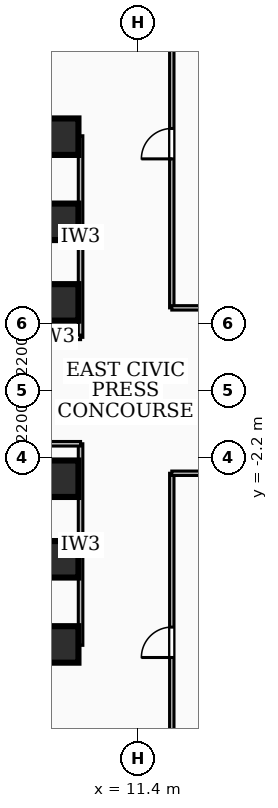
"""IFC4 building model, lengths in metres.
Left out: names, types, materials, properties, quantities, classifications, styles, units other than length and angle.
Written with IfcOpenShell. Run it as: python <this file> out.ifc"""

import sys

from ifc_helpers import new_model, si_unit, direction, frame, frame_2d, origin, origin_2d, place, context, subcontext, project, spatial, rectangle, extrude, element, fill, save


model = new_model("IFC4")
c1 = context("Model", 3, precision=1e-05, world=origin(), true_north=direction((0.0, 1.0)))
c2 = subcontext(c1, "Body", "Model", "MODEL_VIEW")
j1 = project(units=[si_unit("LENGTHUNIT", "METRE"), si_unit("PLANEANGLEUNIT", "RADIAN")], contexts=[c1])
p1 = place(None, origin())
s1 = spatial("IfcSite", under=j1, at=p1, CompositionType="ELEMENT")
p2 = place(p1, origin())
s2 = spatial("IfcBuilding", under=s1, at=p2, CompositionType="ELEMENT")
p3 = place(p2, frame((0.0, 0.0, 14.76)))
s3 = spatial("IfcBuildingStorey", under=s2, at=p3, CompositionType="ELEMENT", Elevation=14.76)
for number, where, z_axis, x_axis in (
    (1, (-8.78, 8.585, 0.0), (0.0, 0.0, 1.0), (1.0, 0.0, 0.0)),
    (2, (8.78, -8.585, 0.0), (0.0, 0.0, 1.0), (-1.0, 0.0, 0.0)),
):
    element("IfcWall", number, at=place(p3, frame(where, z_axis=z_axis, x_axis=x_axis)), inside=s3, PredefinedType="SHEAR", context=c2, shape_type="SweptSolid", body=[
        extrude(rectangle(XDim=17.56, YDim=0.55, at=frame_2d((8.78, 0.0))), origin(), (0.0, 0.0, 1.0), 4.28),
    ])
for number, where, z_axis, x_axis in (
    (3, (8.85, -5.55, 0.0), (0.0, 0.0, 1.0), (1.0, 0.0, 0.0)),
    (4, (8.85, -2.9, 0.0), (0.0, 0.0, 1.0), (1.0, 0.0, 0.0)),
    (5, (8.85, 2.9, 0.0), (0.0, 0.0, 1.0), (1.0, 0.0, 0.0)),
    (6, (8.85, 5.55, 0.0), (0.0, 0.0, 1.0), (1.0, 0.0, 0.0)),
    (7, (8.85, -8.35, 0.0), (0.0, 0.0, 1.0), (1.0, 0.0, 0.0)),
    (8, (8.85, 8.35, 0.0), (0.0, 0.0, 1.0), (1.0, 0.0, 0.0)),
):
    element("IfcColumn", number, at=place(p3, frame(where, z_axis=z_axis, x_axis=x_axis)), inside=s3, PredefinedType="COLUMN", context=c2, shape_type="SweptSolid", body=[
        extrude(rectangle(XDim=1.2, YDim=1.2, at=origin_2d()), origin(), (0.0, 0.0, 1.0), 4.68),
    ])
p4 = place(p3, frame((9.52, 1.75, 0.0), z_axis=(0.0, 0.0, 1.0), x_axis=(0.0, 1.0, 0.0)))
e9 = element("IfcWall", 9, at=p4, inside=s3, PredefinedType="PARTITIONING", context=c2, shape_type="SweptSolid", body=[
    extrude(rectangle(XDim=6.63, YDim=0.15, at=frame_2d((3.315, 0.0))), origin(), (0.0, 0.0, 1.0), 3.29),
])
p5 = place(p3, frame((7.85, 1.75, 0.0), z_axis=(0.0, 0.0, 1.0), x_axis=(1.0, 0.0, 0.0)))
e10 = element("IfcWall", 10, at=p5, inside=s3, PredefinedType="PARTITIONING", context=c2, shape_type="SweptSolid", body=[
    extrude(rectangle(XDim=1.67, YDim=0.15, at=frame_2d((0.835, 0.0))), origin(), (0.0, 0.0, 1.0), 3.345),
])
p6 = place(p3, frame((9.52, -8.38, 0.0), z_axis=(0.0, 0.0, 1.0), x_axis=(0.0, 1.0, 0.0)))
e11 = element("IfcWall", 11, at=p6, inside=s3, PredefinedType="PARTITIONING", context=c2, shape_type="SweptSolid", body=[
    extrude(rectangle(XDim=6.63, YDim=0.15, at=frame_2d((3.315, 0.0))), origin(), (0.0, 0.0, 1.0), 3.29),
])
p7 = place(p3, frame((7.85, -1.75, 0.0), z_axis=(0.0, 0.0, 1.0), x_axis=(1.0, 0.0, 0.0)))
e12 = element("IfcWall", 12, at=p7, inside=s3, PredefinedType="PARTITIONING", context=c2, shape_type="SweptSolid", body=[
    extrude(rectangle(XDim=1.67, YDim=0.15, at=frame_2d((0.835, 0.0))), origin(), (0.0, 0.0, 1.0), 3.345),
])
p8 = place(p3, frame((12.52, 2.72, 0.0), z_axis=(0.0, 0.0, 1.0), x_axis=(0.0, 1.0, 0.0)))
e13 = element("IfcWall", 13, at=p8, inside=s3, PredefinedType="PARTITIONING", context=c2, shape_type="SweptSolid", body=[
    extrude(rectangle(XDim=10.96, YDim=0.145, at=frame_2d((5.48, 0.0))), origin(), (0.0, 0.0, 1.0), 3.29),
])
p9 = place(p8, frame((4.9, 0.0, 0.0)))
e14 = element("IfcOpeningElement", 14, at=p9, cuts=e13, PredefinedType="OPENING", context=c2, shape_type="SweptSolid", body=[
    extrude(rectangle(XDim=1.0, YDim=2.1, at=frame_2d((0.5, 1.05))), frame((0.0, 0.083, 0.0), z_axis=(0.0, -1.0, 0.0), x_axis=(1.0, 0.0, 0.0)), (0.0, 0.0, 1.0), 0.165),
])
p10 = place(p3, frame((12.52, 2.72, 0.0), z_axis=(0.0, 0.0, 1.0), x_axis=(1.0, 0.0, 0.0)))
e15 = element("IfcWall", 15, at=p10, inside=s3, PredefinedType="PARTITIONING", context=c2, shape_type="SweptSolid", body=[
    extrude(rectangle(XDim=9.88, YDim=0.145, at=frame_2d((4.94, 0.0))), origin(), (0.0, 0.0, 1.0), 4.28),
])
p11 = place(p3, frame((12.52, -13.68, 0.0), z_axis=(0.0, 0.0, 1.0), x_axis=(0.0, 1.0, 0.0)))
e16 = element("IfcWall", 16, at=p11, inside=s3, PredefinedType="PARTITIONING", context=c2, shape_type="SweptSolid", body=[
    extrude(rectangle(XDim=10.96, YDim=0.145, at=frame_2d((5.48, 0.0))), origin(), (0.0, 0.0, 1.0), 3.29),
])
p12 = place(p11, frame((4.9, 0.0, 0.0)))
e17 = element("IfcOpeningElement", 17, at=p12, cuts=e16, PredefinedType="OPENING", context=c2, shape_type="SweptSolid", body=[
    extrude(rectangle(XDim=1.0, YDim=2.1, at=frame_2d((0.5, 1.05))), frame((0.0, 0.083, 0.0), z_axis=(0.0, -1.0, 0.0), x_axis=(1.0, 0.0, 0.0)), (0.0, 0.0, 1.0), 0.165),
])
p13 = place(p3, frame((12.52, -2.72, 0.0), z_axis=(0.0, 0.0, 1.0), x_axis=(1.0, 0.0, 0.0)))
e18 = element("IfcWall", 18, at=p13, inside=s3, PredefinedType="PARTITIONING", context=c2, shape_type="SweptSolid", body=[
    extrude(rectangle(XDim=9.88, YDim=0.145, at=frame_2d((4.94, 0.0))), origin(), (0.0, 0.0, 1.0), 4.28),
])
p14 = place(p9, origin())
e19 = element("IfcDoor", 19, at=p14, inside=s3, OperationType="SINGLE_SWING_LEFT", PredefinedType="DOOR", context=c2, shape_type="SweptSolid", body=[
    extrude(rectangle(XDim=1.0, YDim=2.1, at=frame_2d((0.5, 1.05))), frame((0.0, 0.025, 0.0), z_axis=(0.0, -1.0, 0.0), x_axis=(1.0, 0.0, 0.0)), (0.0, 0.0, 1.0), 0.05),
])
fill(e14, e19)
p15 = place(p12, origin())
e20 = element("IfcDoor", 20, at=p15, inside=s3, OperationType="SINGLE_SWING_LEFT", PredefinedType="DOOR", context=c2, shape_type="SweptSolid", body=[
    extrude(rectangle(XDim=1.0, YDim=2.1, at=frame_2d((0.5, 1.05))), frame((0.0, 0.025, 0.0), z_axis=(0.0, -1.0, 0.0), x_axis=(1.0, 0.0, 0.0)), (0.0, 0.0, 1.0), 0.05),
])
fill(e17, e20)
save(model, sys.argv[1])
